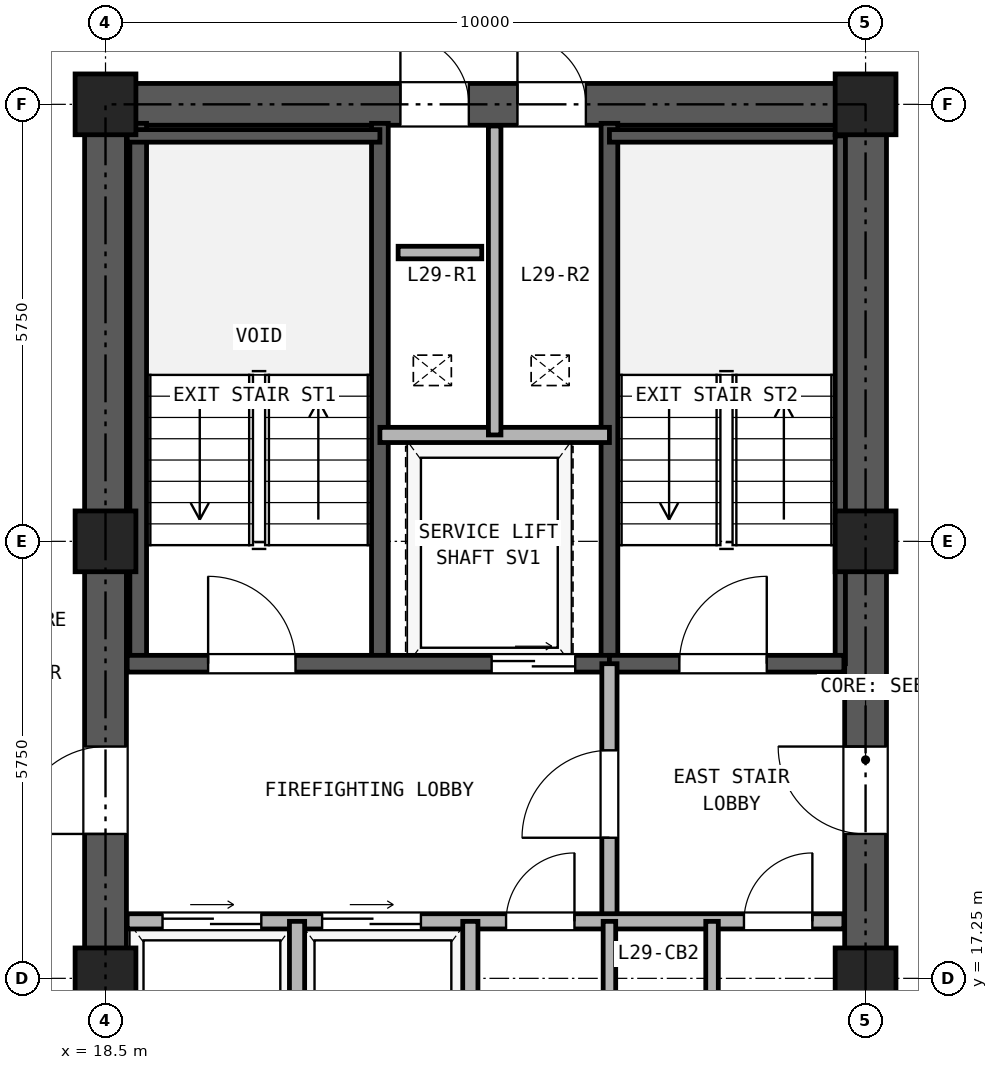
"""IFC4 building model, lengths in metres.
Left out: names, types, materials, properties, quantities, classifications, styles, units other than length and angle.
Written with IfcOpenShell. Run it as: python <this file> out.ifc"""

import sys

from ifc_helpers import new_model, si_unit, direction, frame, frame_2d, origin, origin_2d, place, context, subcontext, project, spatial, rectangle, hollow_rectangle, extrude, source, transform, mapped, element, fill, save


model = new_model("IFC4")
c1 = context("Model", 3, precision=1e-05, world=origin(), true_north=direction((0.0, 1.0)))
c2 = subcontext(c1, "Body", "Model", "MODEL_VIEW")
j1 = project(units=[si_unit("LENGTHUNIT", "METRE"), si_unit("PLANEANGLEUNIT", "RADIAN")], contexts=[c1])
p1 = place(None, origin())
s1 = spatial("IfcSite", under=j1, at=p1, CompositionType="ELEMENT")
p2 = place(p1, origin())
s2 = spatial("IfcBuilding", under=s1, at=p2, CompositionType="ELEMENT")
p3 = place(p2, frame((0.0, 0.0, 108.7)))
s3 = spatial("IfcBuildingStorey", under=s2, at=p3, CompositionType="ELEMENT", Elevation=108.7)
m1 = source(origin(), c2, "Body", "SweptSolid", [
    extrude(hollow_rectangle(XDim=0.8, YDim=0.8, WallThickness=0.045, at=origin_2d()), origin(), (0.0, 0.0, 1.0), 2.95),
])
for number, where, z_axis, x_axis in (
    (1, (18.5, 17.25, 0.0), (0.0, 0.0, 1.0), (1.0, 0.0, 0.0)),
    (2, (18.5, 23.0, 0.0), (0.0, 0.0, 1.0), (1.0, 0.0, 0.0)),
    (3, (18.5, 28.75, 0.0), (0.0, 0.0, 1.0), (1.0, 0.0, 0.0)),
    (4, (28.5, 17.25, 0.0), (0.0, 0.0, 1.0), (1.0, 0.0, 0.0)),
    (5, (28.5, 23.0, 0.0), (0.0, 0.0, 1.0), (1.0, 0.0, 0.0)),
    (6, (28.5, 28.75, 0.0), (0.0, 0.0, 1.0), (1.0, 0.0, 0.0)),
):
    element("IfcColumn", number, at=place(p3, frame(where, z_axis=z_axis, x_axis=x_axis)), inside=s3, PredefinedType="COLUMN", context=c2, shape_type="MappedRepresentation", body=[
        mapped(m1, transform((0.0, 0.0, 0.0), x_axis=(1.0, 0.0, 0.0), y_axis=(0.0, 1.0, 0.0), z_axis=(0.0, 0.0, 1.0), scale=1.0)),
    ])
p4 = place(p3, frame((18.225, 28.75, 0.0), z_axis=(0.0, 0.0, 1.0), x_axis=(1.0, 0.0, 0.0)))
e7 = element("IfcWall", 7, at=p4, inside=s3, PredefinedType="SHEAR", context=c2, shape_type="SweptSolid", body=[
    extrude(rectangle(XDim=10.55, YDim=0.55, at=frame_2d((5.275, 0.0))), origin(), (0.0, 0.0, 1.0), 2.95),
])
p5 = place(p4, frame((4.155, 0.0, 0.0)))
e8 = element("IfcOpeningElement", 8, at=p5, cuts=e7, PredefinedType="OPENING", context=c2, shape_type="SweptSolid", body=[
    extrude(rectangle(XDim=0.9, YDim=2.05, at=frame_2d((0.45, 1.025))), frame((0.0, 0.285, 0.0), z_axis=(0.0, -1.0, 0.0), x_axis=(1.0, 0.0, 0.0)), (0.0, 0.0, 1.0), 0.57),
])
p6 = place(p4, frame((5.695, 0.0, 0.0)))
e9 = element("IfcOpeningElement", 9, at=p6, cuts=e7, PredefinedType="OPENING", context=c2, shape_type="SweptSolid", body=[
    extrude(rectangle(XDim=0.9, YDim=2.05, at=frame_2d((0.45, 1.025))), frame((0.0, 0.285, 0.0), z_axis=(0.0, -1.0, 0.0), x_axis=(1.0, 0.0, 0.0)), (0.0, 0.0, 1.0), 0.57),
])
p7 = place(p3, frame((18.5, 11.775, 0.0), z_axis=(0.0, 0.0, 1.0), x_axis=(0.0, 1.0, 0.0)))
e10 = element("IfcWall", 10, at=p7, inside=s3, PredefinedType="SHEAR", context=c2, shape_type="SweptSolid", body=[
    extrude(rectangle(XDim=16.7, YDim=0.55, at=frame_2d((8.35, 0.0))), origin(), (0.0, 0.0, 1.0), 2.95),
])
p8 = place(p7, frame((7.375, 0.0, 0.0)))
e11 = element("IfcOpeningElement", 11, at=p8, cuts=e10, PredefinedType="OPENING", context=c2, shape_type="SweptSolid", body=[
    extrude(rectangle(XDim=1.15, YDim=2.2, at=frame_2d((0.575, 1.1))), frame((0.0, 0.285, 0.0), z_axis=(0.0, -1.0, 0.0), x_axis=(1.0, 0.0, 0.0)), (0.0, 0.0, 1.0), 0.57),
])
p9 = place(p3, frame((28.5, 11.775, 0.0), z_axis=(0.0, 0.0, 1.0), x_axis=(0.0, 1.0, 0.0)))
e12 = element("IfcWall", 12, at=p9, inside=s3, PredefinedType="SHEAR", context=c2, shape_type="SweptSolid", body=[
    extrude(rectangle(XDim=16.7, YDim=0.55, at=frame_2d((8.35, 0.0))), origin(), (0.0, 0.0, 1.0), 2.95),
])
p10 = place(p9, frame((7.375, 0.0, 0.0)))
e13 = element("IfcOpeningElement", 13, at=p10, cuts=e12, PredefinedType="OPENING", context=c2, shape_type="SweptSolid", body=[
    extrude(rectangle(XDim=1.15, YDim=2.2, at=frame_2d((0.575, 1.1))), frame((0.0, 0.285, 0.0), z_axis=(0.0, -1.0, 0.0), x_axis=(1.0, 0.0, 0.0)), (0.0, 0.0, 1.0), 0.57),
])
for number, where, z_axis, x_axis in (
    (14, (18.93, 21.39, 0.0), (0.0, 0.0, 1.0), (0.0, 1.0, 0.0)),
    (15, (22.11, 21.39, 0.0), (0.0, 0.0, 1.0), (0.0, 1.0, 0.0)),
    (16, (25.13, 21.39, 0.0), (0.0, 0.0, 1.0), (0.0, 1.0, 0.0)),
):
    element("IfcWall", number, at=place(p3, frame(where, z_axis=z_axis, x_axis=x_axis)), inside=s3, PredefinedType="SOLIDWALL", context=c2, shape_type="SweptSolid", body=[
        extrude(rectangle(XDim=7.11, YDim=0.22, at=frame_2d((3.555, 0.0))), origin(), (0.0, 0.0, 1.0), 2.95),
    ])
p11 = place(p3, frame((18.785, 28.335, 0.0), z_axis=(0.0, 0.0, 1.0), x_axis=(1.0, 0.0, 0.0)))
e17 = element("IfcWall", 17, at=p11, inside=s3, PredefinedType="PARTITIONING", context=c2, shape_type="SweptSolid", body=[
    extrude(rectangle(XDim=3.325, YDim=0.165, at=frame_2d((1.663, 0.0))), origin(), (0.0, 0.0, 1.0), 2.95),
])
p12 = place(p3, frame((25.13, 28.335, 0.0), z_axis=(0.0, 0.0, 1.0), x_axis=(1.0, 0.0, 0.0)))
e18 = element("IfcWall", 18, at=p12, inside=s3, PredefinedType="PARTITIONING", context=c2, shape_type="SweptSolid", body=[
    extrude(rectangle(XDim=3.085, YDim=0.165, at=frame_2d((1.542, 0.0))), origin(), (0.0, 0.0, 1.0), 2.95),
])
p13 = place(p3, frame((28.167, 21.39, 0.0), z_axis=(0.0, 0.0, 1.0), x_axis=(0.0, 1.0, 0.0)))
e19 = element("IfcWall", 19, at=p13, inside=s3, PredefinedType="PARTITIONING", context=c2, shape_type="SweptSolid", body=[
    extrude(rectangle(XDim=6.945, YDim=0.135, at=frame_2d((3.473, 0.0))), origin(), (0.0, 0.0, 1.0), 2.95),
])
p14 = place(p3, frame((18.785, 21.39, 0.0), z_axis=(0.0, 0.0, 1.0), x_axis=(1.0, 0.0, 0.0)))
e20 = element("IfcWall", 20, at=p14, inside=s3, PredefinedType="SOLIDWALL", context=c2, shape_type="SweptSolid", body=[
    extrude(rectangle(XDim=6.345, YDim=0.22, at=frame_2d((3.172, 0.0))), origin(), (0.0, 0.0, 1.0), 2.95),
])
p15 = place(p14, frame((1.065, 0.0, 0.0)))
e21 = element("IfcOpeningElement", 21, at=p15, cuts=e20, PredefinedType="OPENING", context=c2, shape_type="SweptSolid", body=[
    extrude(rectangle(XDim=1.15, YDim=2.2, at=frame_2d((0.575, 1.1))), frame((0.0, 0.12, 0.0), z_axis=(0.0, -1.0, 0.0), x_axis=(1.0, 0.0, 0.0)), (0.0, 0.0, 1.0), 0.24),
])
p16 = place(p14, frame((4.795, 0.0, 0.0)))
e22 = element("IfcOpeningElement", 22, at=p16, cuts=e20, PredefinedType="OPENING", context=c2, shape_type="SweptSolid", body=[
    extrude(rectangle(XDim=1.1, YDim=2.25, at=frame_2d((0.55, 1.125))), frame((0.0, 0.12, 0.0), z_axis=(0.0, -1.0, 0.0), x_axis=(1.0, 0.0, 0.0)), (0.0, 0.0, 1.0), 0.24),
])
p17 = place(p3, frame((25.13, 21.39, 0.0), z_axis=(0.0, 0.0, 1.0), x_axis=(1.0, 0.0, 0.0)))
e23 = element("IfcWall", 23, at=p17, inside=s3, PredefinedType="SOLIDWALL", context=c2, shape_type="SweptSolid", body=[
    extrude(rectangle(XDim=3.085, YDim=0.22, at=frame_2d((1.542, 0.0))), origin(), (0.0, 0.0, 1.0), 2.95),
])
p18 = place(p17, frame((0.92, 0.0, 0.0)))
e24 = element("IfcOpeningElement", 24, at=p18, cuts=e23, PredefinedType="OPENING", context=c2, shape_type="SweptSolid", body=[
    extrude(rectangle(XDim=1.15, YDim=2.2, at=frame_2d((0.575, 1.1))), frame((0.0, 0.12, 0.0), z_axis=(0.0, -1.0, 0.0), x_axis=(1.0, 0.0, 0.0)), (0.0, 0.0, 1.0), 0.24),
])
p19 = place(p3, frame((22.11, 24.4, 0.0), z_axis=(0.0, 0.0, 1.0), x_axis=(1.0, 0.0, 0.0)))
e25 = element("IfcWall", 25, at=p19, inside=s3, PredefinedType="PARTITIONING", context=c2, shape_type="SweptSolid", body=[
    extrude(rectangle(XDim=3.02, YDim=0.2, at=frame_2d((1.51, 0.0))), origin(), (0.0, 0.0, 1.0), 2.95),
])
p20 = place(p3, frame((23.62, 24.4, 0.0), z_axis=(0.0, 0.0, 1.0), x_axis=(0.0, 1.0, 0.0)))
e26 = element("IfcWall", 26, at=p20, inside=s3, PredefinedType="PARTITIONING", context=c2, shape_type="SweptSolid", body=[
    extrude(rectangle(XDim=4.065, YDim=0.165, at=frame_2d((2.033, 0.0))), origin(), (0.0, 0.0, 1.0), 2.95),
])
p21 = place(p3, frame((25.13, 18.0, 0.0), z_axis=(0.0, 0.0, 1.0), x_axis=(0.0, 1.0, 0.0)))
e27 = element("IfcWall", 27, at=p21, inside=s3, PredefinedType="PARTITIONING", context=c2, shape_type="SweptSolid", body=[
    extrude(rectangle(XDim=3.39, YDim=0.2, at=frame_2d((1.695, 0.0))), origin(), (0.0, 0.0, 1.0), 2.95),
])
p22 = place(p21, frame((1.1, 0.0, 0.0)))
e28 = element("IfcOpeningElement", 28, at=p22, cuts=e27, PredefinedType="OPENING", context=c2, shape_type="SweptSolid", body=[
    extrude(rectangle(XDim=1.15, YDim=2.2, at=frame_2d((0.575, 1.1))), frame((0.0, 0.11, 0.0), z_axis=(0.0, -1.0, 0.0), x_axis=(1.0, 0.0, 0.0)), (0.0, 0.0, 1.0), 0.22),
])
p23 = place(p3, frame((18.785, 18.0, 0.0), z_axis=(0.0, 0.0, 1.0), x_axis=(1.0, 0.0, 0.0)))
e29 = element("IfcWall", 29, at=p23, inside=s3, PredefinedType="PARTITIONING", context=c2, shape_type="SweptSolid", body=[
    extrude(rectangle(XDim=9.43, YDim=0.2, at=frame_2d((4.715, 0.0))), origin(), (0.0, 0.0, 1.0), 2.95),
])
p24 = place(p23, frame((0.465, 0.0, 0.0)))
e30 = element("IfcOpeningElement", 30, at=p24, cuts=e29, PredefinedType="OPENING", context=c2, shape_type="SweptSolid", body=[
    extrude(rectangle(XDim=1.3, YDim=2.3, at=frame_2d((0.65, 1.15))), frame((0.0, 0.11, 0.0), z_axis=(0.0, -1.0, 0.0), x_axis=(1.0, 0.0, 0.0)), (0.0, 0.0, 1.0), 0.22),
])
p25 = place(p23, frame((2.565, 0.0, 0.0)))
e31 = element("IfcOpeningElement", 31, at=p25, cuts=e29, PredefinedType="OPENING", context=c2, shape_type="SweptSolid", body=[
    extrude(rectangle(XDim=1.3, YDim=2.3, at=frame_2d((0.65, 1.15))), frame((0.0, 0.11, 0.0), z_axis=(0.0, -1.0, 0.0), x_axis=(1.0, 0.0, 0.0)), (0.0, 0.0, 1.0), 0.22),
])
p26 = place(p23, frame((4.985, 0.0, 0.0)))
e32 = element("IfcOpeningElement", 32, at=p26, cuts=e29, PredefinedType="OPENING", context=c2, shape_type="SweptSolid", body=[
    extrude(rectangle(XDim=0.9, YDim=2.05, at=frame_2d((0.45, 1.025))), frame((0.0, 0.11, 0.0), z_axis=(0.0, -1.0, 0.0), x_axis=(1.0, 0.0, 0.0)), (0.0, 0.0, 1.0), 0.22),
])
p27 = place(p23, frame((8.115, 0.0, 0.0)))
e33 = element("IfcOpeningElement", 33, at=p27, cuts=e29, PredefinedType="OPENING", context=c2, shape_type="SweptSolid", body=[
    extrude(rectangle(XDim=0.9, YDim=2.05, at=frame_2d((0.45, 1.025))), frame((0.0, 0.11, 0.0), z_axis=(0.0, -1.0, 0.0), x_axis=(1.0, 0.0, 0.0)), (0.0, 0.0, 1.0), 0.22),
])
for number, where, z_axis, x_axis in (
    (34, (21.02, 15.0, 0.0), (0.0, 0.0, 1.0), (0.0, 1.0, 0.0)),
    (35, (23.3, 15.0, 0.0), (0.0, 0.0, 1.0), (0.0, 1.0, 0.0)),
):
    element("IfcWall", number, at=place(p3, frame(where, z_axis=z_axis, x_axis=x_axis)), inside=s3, PredefinedType="PARTITIONING", context=c2, shape_type="SweptSolid", body=[
        extrude(rectangle(XDim=3.0, YDim=0.2, at=frame_2d((1.5, 0.0))), origin(), (0.0, 0.0, 1.0), 2.95),
    ])
p28 = place(p3, frame((25.13, 15.0, 0.0), z_axis=(0.0, 0.0, 1.0), x_axis=(0.0, 1.0, 0.0)))
e36 = element("IfcWall", 36, at=p28, inside=s3, PredefinedType="PARTITIONING", context=c2, shape_type="SweptSolid", body=[
    extrude(rectangle(XDim=3.0, YDim=0.165, at=frame_2d((1.5, 0.0))), origin(), (0.0, 0.0, 1.0), 2.95),
])
p29 = place(p3, frame((26.48, 15.0, 0.0), z_axis=(0.0, 0.0, 1.0), x_axis=(0.0, 1.0, 0.0)))
e37 = element("IfcWall", 37, at=p29, inside=s3, PredefinedType="PARTITIONING", context=c2, shape_type="SweptSolid", body=[
    extrude(rectangle(XDim=3.0, YDim=0.165, at=frame_2d((1.5, 0.0))), origin(), (0.0, 0.0, 1.0), 2.95),
])
p30 = place(p29, frame((1.05, 0.0, 0.0)))
e38 = element("IfcOpeningElement", 38, at=p30, cuts=e37, PredefinedType="OPENING", context=c2, shape_type="SweptSolid", body=[
    extrude(rectangle(XDim=0.9, YDim=2.05, at=frame_2d((0.45, 1.025))), frame((0.0, 0.093, 0.0), z_axis=(0.0, -1.0, 0.0), x_axis=(1.0, 0.0, 0.0)), (0.0, 0.0, 1.0), 0.185),
])
p31 = place(p3, frame((22.35, 26.8, 0.0), z_axis=(0.0, 0.0, 1.0), x_axis=(1.0, 0.0, 0.0)))
e39 = element("IfcWall", 39, at=p31, inside=s3, PredefinedType="PARTITIONING", context=c2, shape_type="SweptSolid", body=[
    extrude(rectangle(XDim=1.1, YDim=0.165, at=frame_2d((0.55, 0.0))), origin(), (0.0, 0.0, 1.0), 2.95),
])
p32 = place(p15, frame((1.15, 0.0, 0.0), z_axis=(0.0, 0.0, 1.0), x_axis=(-1.0, 0.0, 0.0)))
e40 = element("IfcDoor", 40, at=p32, inside=s3, OperationType="SINGLE_SWING_LEFT", PredefinedType="DOOR", context=c2, shape_type="SweptSolid", body=[
    extrude(rectangle(XDim=1.15, YDim=2.2, at=frame_2d((0.575, 1.1))), frame((0.0, 0.025, 0.0), z_axis=(0.0, -1.0, 0.0), x_axis=(1.0, 0.0, 0.0)), (0.0, 0.0, 1.0), 0.05),
])
fill(e21, e40)
p33 = place(p18, frame((1.15, 0.0, 0.0), z_axis=(0.0, 0.0, 1.0), x_axis=(-1.0, 0.0, 0.0)))
e41 = element("IfcDoor", 41, at=p33, inside=s3, OperationType="SINGLE_SWING_RIGHT", PredefinedType="DOOR", context=c2, shape_type="SweptSolid", body=[
    extrude(rectangle(XDim=1.15, YDim=2.2, at=frame_2d((0.575, 1.1))), frame((0.0, 0.025, 0.0), z_axis=(0.0, -1.0, 0.0), x_axis=(1.0, 0.0, 0.0)), (0.0, 0.0, 1.0), 0.05),
])
fill(e24, e41)
p34 = place(p16, frame((1.1, 0.0, 0.0), z_axis=(0.0, 0.0, 1.0), x_axis=(-1.0, 0.0, 0.0)))
e42 = element("IfcDoor", 42, at=p34, inside=s3, OperationType="DOUBLE_DOOR_SLIDING", PredefinedType="DOOR", context=c2, shape_type="SweptSolid", body=[
    extrude(rectangle(XDim=1.1, YDim=2.25, at=frame_2d((0.55, 1.125))), frame((0.0, 0.025, 0.0), z_axis=(0.0, -1.0, 0.0), x_axis=(1.0, 0.0, 0.0)), (0.0, 0.0, 1.0), 0.05),
])
fill(e22, e42)
p35 = place(p22, origin())
e43 = element("IfcDoor", 43, at=p35, inside=s3, OperationType="SINGLE_SWING_LEFT", PredefinedType="DOOR", context=c2, shape_type="SweptSolid", body=[
    extrude(rectangle(XDim=1.15, YDim=2.2, at=frame_2d((0.575, 1.1))), frame((0.0, 0.025, 0.0), z_axis=(0.0, -1.0, 0.0), x_axis=(1.0, 0.0, 0.0)), (0.0, 0.0, 1.0), 0.05),
])
fill(e28, e43)
p36 = place(p24, origin())
e44 = element("IfcDoor", 44, at=p36, inside=s3, OperationType="DOUBLE_DOOR_SLIDING", PredefinedType="DOOR", context=c2, shape_type="SweptSolid", body=[
    extrude(rectangle(XDim=1.3, YDim=2.3, at=frame_2d((0.65, 1.15))), frame((0.0, 0.025, 0.0), z_axis=(0.0, -1.0, 0.0), x_axis=(1.0, 0.0, 0.0)), (0.0, 0.0, 1.0), 0.05),
])
fill(e30, e44)
p37 = place(p25, origin())
e45 = element("IfcDoor", 45, at=p37, inside=s3, OperationType="DOUBLE_DOOR_SLIDING", PredefinedType="DOOR", context=c2, shape_type="SweptSolid", body=[
    extrude(rectangle(XDim=1.3, YDim=2.3, at=frame_2d((0.65, 1.15))), frame((0.0, 0.025, 0.0), z_axis=(0.0, -1.0, 0.0), x_axis=(1.0, 0.0, 0.0)), (0.0, 0.0, 1.0), 0.05),
])
fill(e31, e45)
p38 = place(p26, frame((0.9, 0.0, 0.0), z_axis=(0.0, 0.0, 1.0), x_axis=(-1.0, 0.0, 0.0)))
e46 = element("IfcDoor", 46, at=p38, inside=s3, OperationType="SINGLE_SWING_RIGHT", PredefinedType="DOOR", context=c2, shape_type="SweptSolid", body=[
    extrude(rectangle(XDim=0.9, YDim=2.05, at=frame_2d((0.45, 1.025))), frame((0.0, 0.025, 0.0), z_axis=(0.0, -1.0, 0.0), x_axis=(1.0, 0.0, 0.0)), (0.0, 0.0, 1.0), 0.05),
])
fill(e32, e46)
p39 = place(p27, frame((0.9, 0.0, 0.0), z_axis=(0.0, 0.0, 1.0), x_axis=(-1.0, 0.0, 0.0)))
e47 = element("IfcDoor", 47, at=p39, inside=s3, OperationType="SINGLE_SWING_RIGHT", PredefinedType="DOOR", context=c2, shape_type="SweptSolid", body=[
    extrude(rectangle(XDim=0.9, YDim=2.05, at=frame_2d((0.45, 1.025))), frame((0.0, 0.025, 0.0), z_axis=(0.0, -1.0, 0.0), x_axis=(1.0, 0.0, 0.0)), (0.0, 0.0, 1.0), 0.05),
])
fill(e33, e47)
p40 = place(p8, frame((1.15, 0.0, 0.0), z_axis=(0.0, 0.0, 1.0), x_axis=(-1.0, 0.0, 0.0)))
e48 = element("IfcDoor", 48, at=p40, inside=s3, OperationType="SINGLE_SWING_LEFT", PredefinedType="DOOR", context=c2, shape_type="SweptSolid", body=[
    extrude(rectangle(XDim=1.15, YDim=2.2, at=frame_2d((0.575, 1.1))), frame((0.0, 0.025, 0.0), z_axis=(0.0, -1.0, 0.0), x_axis=(1.0, 0.0, 0.0)), (0.0, 0.0, 1.0), 0.05),
])
fill(e11, e48)
p41 = place(p10, origin())
e49 = element("IfcDoor", 49, at=p41, inside=s3, OperationType="SINGLE_SWING_RIGHT", PredefinedType="DOOR", context=c2, shape_type="SweptSolid", body=[
    extrude(rectangle(XDim=1.15, YDim=2.2, at=frame_2d((0.575, 1.1))), frame((0.0, 0.025, 0.0), z_axis=(0.0, -1.0, 0.0), x_axis=(1.0, 0.0, 0.0)), (0.0, 0.0, 1.0), 0.05),
])
fill(e13, e49)
p42 = place(p5, origin())
e50 = element("IfcDoor", 50, at=p42, inside=s3, OperationType="SINGLE_SWING_LEFT", PredefinedType="DOOR", context=c2, shape_type="SweptSolid", body=[
    extrude(rectangle(XDim=0.9, YDim=2.05, at=frame_2d((0.45, 1.025))), frame((0.0, 0.025, 0.0), z_axis=(0.0, -1.0, 0.0), x_axis=(1.0, 0.0, 0.0)), (0.0, 0.0, 1.0), 0.05),
])
fill(e8, e50)
p43 = place(p6, origin())
e51 = element("IfcDoor", 51, at=p43, inside=s3, OperationType="SINGLE_SWING_LEFT", PredefinedType="DOOR", context=c2, shape_type="SweptSolid", body=[
    extrude(rectangle(XDim=0.9, YDim=2.05, at=frame_2d((0.45, 1.025))), frame((0.0, 0.025, 0.0), z_axis=(0.0, -1.0, 0.0), x_axis=(1.0, 0.0, 0.0)), (0.0, 0.0, 1.0), 0.05),
])
fill(e9, e51)
save(model, sys.argv[1])
